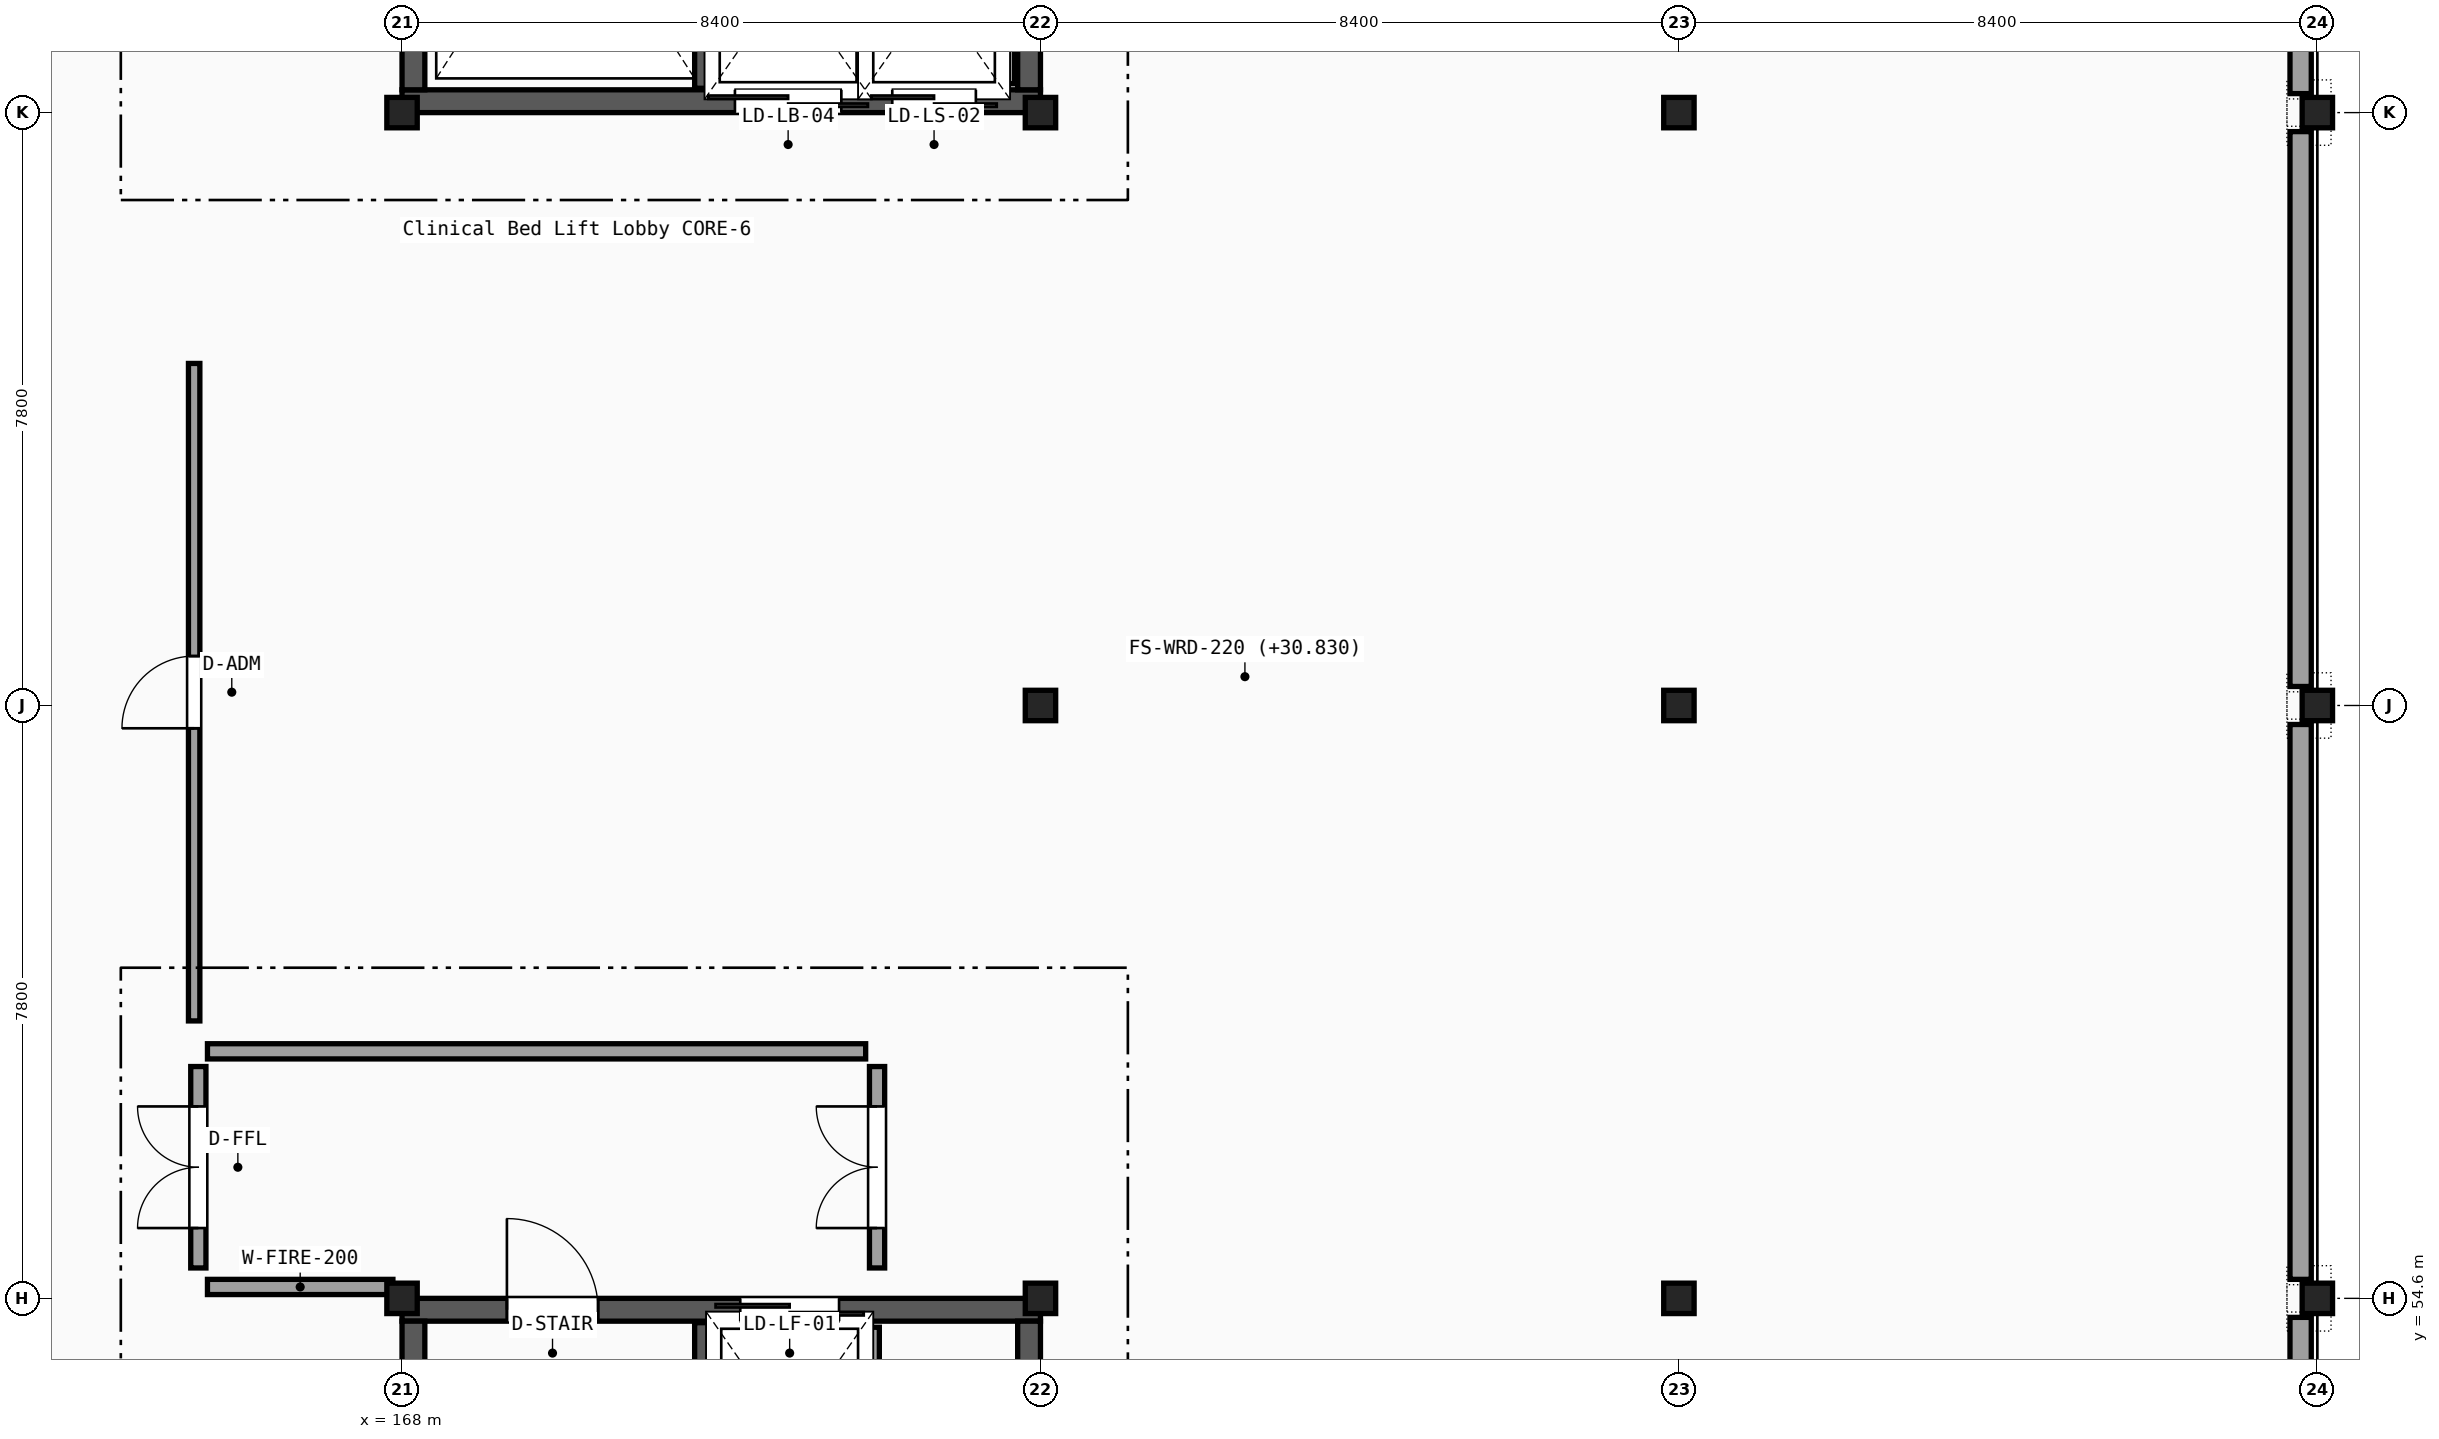
"""IFC4 building model, lengths in metres.
Left out: names, types, materials, properties, quantities, classifications, styles, units other than length and angle.
Written with IfcOpenShell. Run it as: python <this file> out.ifc"""

import sys

from ifc_helpers import new_model, si_unit, direction, frame, frame_2d, origin, origin_2d, place, context, subcontext, project, spatial, rectangle, i_section, extrude, element, fill, save


model = new_model("IFC4")
c1 = context("Model", 3, precision=1e-05, world=origin(), true_north=direction((0.0, 1.0)))
c2 = subcontext(c1, "Body", "Model", "MODEL_VIEW")
j1 = project(units=[si_unit("LENGTHUNIT", "METRE"), si_unit("PLANEANGLEUNIT", "RADIAN")], contexts=[c1])
p1 = place(None, origin())
s1 = spatial("IfcSite", under=j1, at=p1, CompositionType="ELEMENT")
p2 = place(p1, origin())
s2 = spatial("IfcBuilding", under=s1, at=p2, CompositionType="ELEMENT")
p3 = place(p2, frame((0.0, 0.0, 31.05)))
s3 = spatial("IfcBuildingStorey", under=s2, at=p3, CompositionType="ELEMENT", Elevation=31.05)
for number, where, z_axis, x_axis in (
    (1, (168.0, 54.6, 0.0), (0.0, 0.0, 1.0), (1.0, 0.0, 0.0)),
    (2, (168.0, 70.2, 0.0), (0.0, 0.0, 1.0), (1.0, 0.0, 0.0)),
    (3, (176.4, 54.6, 0.0), (0.0, 0.0, 1.0), (1.0, 0.0, 0.0)),
    (4, (176.4, 62.4, 0.0), (0.0, 0.0, 1.0), (1.0, 0.0, 0.0)),
    (5, (176.4, 70.2, 0.0), (0.0, 0.0, 1.0), (1.0, 0.0, 0.0)),
    (6, (184.8, 54.6, 0.0), (0.0, 0.0, 1.0), (1.0, 0.0, 0.0)),
    (7, (184.8, 62.4, 0.0), (0.0, 0.0, 1.0), (1.0, 0.0, 0.0)),
    (8, (184.8, 70.2, 0.0), (0.0, 0.0, 1.0), (1.0, 0.0, 0.0)),
    (9, (193.2, 54.6, 0.0), (0.0, 0.0, 1.0), (1.0, 0.0, 0.0)),
    (10, (193.2, 62.4, 0.0), (0.0, 0.0, 1.0), (1.0, 0.0, 0.0)),
    (11, (193.2, 70.2, 0.0), (0.0, 0.0, 1.0), (1.0, 0.0, 0.0)),
):
    element("IfcColumn", number, at=place(p3, frame(where, z_axis=z_axis, x_axis=x_axis)), inside=s3, PredefinedType="COLUMN", context=c2, shape_type="SweptSolid", body=[
        extrude(i_section(OverallWidth=0.3, OverallDepth=0.4, WebThickness=0.013, FlangeThickness=0.024, FilletRadius=0.027, at=origin_2d()), origin(), (0.0, 0.0, 1.0), 4.05),
    ])
p4 = place(p3, frame((192.98, 47.05, 0.0), z_axis=(0.0, 0.0, 1.0), x_axis=(0.0, 1.0, 0.0)))
e12 = element("IfcWall", 12, at=p4, inside=s3, PredefinedType="SOLIDWALL", context=c2, shape_type="SweptSolid", body=[
    extrude(rectangle(XDim=7.3, YDim=0.28, at=frame_2d((3.65, 0.0))), origin(), (0.0, 0.0, 1.0), 3.44),
])
p5 = place(p3, frame((192.98, 54.85, 0.0), z_axis=(0.0, 0.0, 1.0), x_axis=(0.0, 1.0, 0.0)))
e13 = element("IfcWall", 13, at=p5, inside=s3, PredefinedType="SOLIDWALL", context=c2, shape_type="SweptSolid", body=[
    extrude(rectangle(XDim=7.3, YDim=0.28, at=frame_2d((3.65, 0.0))), origin(), (0.0, 0.0, 1.0), 3.44),
])
p6 = place(p3, frame((192.98, 62.65, 0.0), z_axis=(0.0, 0.0, 1.0), x_axis=(0.0, 1.0, 0.0)))
e14 = element("IfcWall", 14, at=p6, inside=s3, PredefinedType="SOLIDWALL", context=c2, shape_type="SweptSolid", body=[
    extrude(rectangle(XDim=7.3, YDim=0.28, at=frame_2d((3.65, 0.0))), origin(), (0.0, 0.0, 1.0), 3.44),
])
p7 = place(p3, frame((192.98, 70.45, 0.0), z_axis=(0.0, 0.0, 1.0), x_axis=(0.0, 1.0, 0.0)))
e15 = element("IfcWall", 15, at=p7, inside=s3, PredefinedType="SOLIDWALL", context=c2, shape_type="SweptSolid", body=[
    extrude(rectangle(XDim=7.3, YDim=0.28, at=frame_2d((3.65, 0.0))), origin(), (0.0, 0.0, 1.0), 3.44),
])
p8 = place(p7, frame((2.05, 0.0, 0.75)))
e16 = element("IfcOpeningElement", 16, at=p8, cuts=e15, PredefinedType="OPENING", context=c2, shape_type="SweptSolid", body=[
    extrude(rectangle(XDim=3.2, YDim=1.8, at=frame_2d((1.6, 0.9))), frame((0.0, 0.15, 0.0), z_axis=(0.0, -1.0, 0.0), x_axis=(1.0, 0.0, 0.0)), (0.0, 0.0, 1.0), 0.3),
])
p9 = place(p3, frame((168.0, 54.45, 0.0), z_axis=(0.0, 0.0, 1.0), x_axis=(1.0, 0.0, 0.0)))
e17 = element("IfcWall", 17, at=p9, inside=s3, PredefinedType="SHEAR", context=c2, shape_type="SweptSolid", body=[
    extrude(rectangle(XDim=8.4, YDim=0.3, at=frame_2d((4.2, 0.0))), origin(), (0.0, 0.0, 1.0), 3.81),
])
p10 = place(p9, frame((1.38, 0.0, 0.0)))
e18 = element("IfcOpeningElement", 18, at=p10, cuts=e17, PredefinedType="OPENING", context=c2, shape_type="SweptSolid", body=[
    extrude(rectangle(XDim=1.2, YDim=2.15, at=frame_2d((0.6, 1.075))), frame((0.0, 0.16, 0.0), z_axis=(0.0, -1.0, 0.0), x_axis=(1.0, 0.0, 0.0)), (0.0, 0.0, 1.0), 0.32),
])
p11 = place(p9, frame((4.45, 0.0, 0.0)))
e19 = element("IfcOpeningElement", 19, at=p11, cuts=e17, PredefinedType="OPENING", context=c2, shape_type="SweptSolid", body=[
    extrude(rectangle(XDim=1.3, YDim=2.2, at=frame_2d((0.65, 1.1))), frame((0.0, 0.16, 0.0), z_axis=(0.0, -1.0, 0.0), x_axis=(1.0, 0.0, 0.0)), (0.0, 0.0, 1.0), 0.32),
])
for number, where, z_axis, x_axis in (
    (20, (168.15, 47.1, 0.0), (0.0, 0.0, 1.0), (0.0, 1.0, 0.0)),
    (21, (176.25, 47.1, 0.0), (0.0, 0.0, 1.0), (0.0, 1.0, 0.0)),
):
    element("IfcWall", number, at=place(p3, frame(where, z_axis=z_axis, x_axis=x_axis)), inside=s3, PredefinedType="SHEAR", context=c2, shape_type="SweptSolid", body=[
        extrude(rectangle(XDim=7.2, YDim=0.3, at=frame_2d((3.6, 0.0))), origin(), (0.0, 0.0, 1.0), 3.81),
    ])
p12 = place(p3, frame((171.95, 47.12, 0.0), z_axis=(0.0, 0.0, 1.0), x_axis=(0.0, 1.0, 0.0)))
e22 = element("IfcWall", 22, at=p12, inside=s3, PredefinedType="SHEAR", context=c2, shape_type="SweptSolid", body=[
    extrude(rectangle(XDim=7.16, YDim=0.2, at=frame_2d((3.58, 0.0))), origin(), (0.0, 0.0, 1.0), 3.81),
])
p13 = place(p3, frame((174.18, 51.48, 0.0), z_axis=(0.0, 0.0, 1.0), x_axis=(0.0, 1.0, 0.0)))
e23 = element("IfcWall", 23, at=p13, inside=s3, PredefinedType="PARTITIONING", context=c2, shape_type="SweptSolid", body=[
    extrude(rectangle(XDim=2.74, YDim=0.2, at=frame_2d((1.37, 0.0))), origin(), (0.0, 0.0, 1.0), 3.34),
])
p14 = place(p3, frame((165.44, 54.75, 0.0), z_axis=(0.0, 0.0, 1.0), x_axis=(1.0, 0.0, 0.0)))
e24 = element("IfcWall", 24, at=p14, inside=s3, PredefinedType="PARTITIONING", context=c2, shape_type="SweptSolid", body=[
    extrude(rectangle(XDim=2.44, YDim=0.2, at=frame_2d((1.22, 0.0))), origin(), (0.0, 0.0, 1.0), 3.34),
])
p15 = place(p3, frame((165.44, 57.85, 0.0), z_axis=(0.0, 0.0, 1.0), x_axis=(1.0, 0.0, 0.0)))
e25 = element("IfcWall", 25, at=p15, inside=s3, PredefinedType="PARTITIONING", context=c2, shape_type="SweptSolid", body=[
    extrude(rectangle(XDim=8.66, YDim=0.2, at=frame_2d((4.33, 0.0))), origin(), (0.0, 0.0, 1.0), 3.34),
])
p16 = place(p3, frame((165.32, 55.0, 0.0), z_axis=(0.0, 0.0, 1.0), x_axis=(0.0, 1.0, 0.0)))
e26 = element("IfcWall", 26, at=p16, inside=s3, PredefinedType="PARTITIONING", context=c2, shape_type="SweptSolid", body=[
    extrude(rectangle(XDim=2.65, YDim=0.2, at=frame_2d((1.325, 0.0))), origin(), (0.0, 0.0, 1.0), 3.34),
])
p17 = place(p16, frame((0.525, 0.0, 0.0)))
e27 = element("IfcOpeningElement", 27, at=p17, cuts=e26, PredefinedType="OPENING", context=c2, shape_type="SweptSolid", body=[
    extrude(rectangle(XDim=1.6, YDim=2.2, at=frame_2d((0.8, 1.1))), frame((0.0, 0.11, 0.0), z_axis=(0.0, -1.0, 0.0), x_axis=(1.0, 0.0, 0.0)), (0.0, 0.0, 1.0), 0.22),
])
p18 = place(p3, frame((174.25, 55.0, 0.0), z_axis=(0.0, 0.0, 1.0), x_axis=(0.0, 1.0, 0.0)))
e28 = element("IfcWall", 28, at=p18, inside=s3, PredefinedType="PARTITIONING", context=c2, shape_type="SweptSolid", body=[
    extrude(rectangle(XDim=2.65, YDim=0.2, at=frame_2d((1.325, 0.0))), origin(), (0.0, 0.0, 1.0), 3.34),
])
p19 = place(p18, frame((0.525, 0.0, 0.0)))
e29 = element("IfcOpeningElement", 29, at=p19, cuts=e28, PredefinedType="OPENING", context=c2, shape_type="SweptSolid", body=[
    extrude(rectangle(XDim=1.6, YDim=2.2, at=frame_2d((0.8, 1.1))), frame((0.0, 0.11, 0.0), z_axis=(0.0, -1.0, 0.0), x_axis=(1.0, 0.0, 0.0)), (0.0, 0.0, 1.0), 0.22),
])
p20 = place(p3, frame((168.0, 70.35, 0.0), z_axis=(0.0, 0.0, 1.0), x_axis=(1.0, 0.0, 0.0)))
e30 = element("IfcWall", 30, at=p20, inside=s3, PredefinedType="SHEAR", context=c2, shape_type="SweptSolid", body=[
    extrude(rectangle(XDim=8.4, YDim=0.3, at=frame_2d((4.2, 0.0))), origin(), (0.0, 0.0, 1.0), 3.81),
])
p21 = place(p20, frame((4.38, 0.0, 0.0)))
e31 = element("IfcOpeningElement", 31, at=p21, cuts=e30, PredefinedType="OPENING", context=c2, shape_type="SweptSolid", body=[
    extrude(rectangle(XDim=1.4, YDim=2.2, at=frame_2d((0.7, 1.1))), frame((0.0, 0.16, 0.0), z_axis=(0.0, -1.0, 0.0), x_axis=(1.0, 0.0, 0.0)), (0.0, 0.0, 1.0), 0.32),
])
p22 = place(p20, frame((6.45, 0.0, 0.0)))
e32 = element("IfcOpeningElement", 32, at=p22, cuts=e30, PredefinedType="OPENING", context=c2, shape_type="SweptSolid", body=[
    extrude(rectangle(XDim=1.1, YDim=2.15, at=frame_2d((0.55, 1.075))), frame((0.0, 0.16, 0.0), z_axis=(0.0, -1.0, 0.0), x_axis=(1.0, 0.0, 0.0)), (0.0, 0.0, 1.0), 0.32),
])
for number, where, z_axis, x_axis in (
    (33, (168.15, 70.5, 0.0), (0.0, 0.0, 1.0), (0.0, 1.0, 0.0)),
    (34, (176.25, 70.5, 0.0), (0.0, 0.0, 1.0), (0.0, 1.0, 0.0)),
):
    element("IfcWall", number, at=place(p3, frame(where, z_axis=z_axis, x_axis=x_axis)), inside=s3, PredefinedType="SHEAR", context=c2, shape_type="SweptSolid", body=[
        extrude(rectangle(XDim=7.2, YDim=0.3, at=frame_2d((3.6, 0.0))), origin(), (0.0, 0.0, 1.0), 3.81),
    ])
p23 = place(p3, frame((171.95, 70.52, 0.0), z_axis=(0.0, 0.0, 1.0), x_axis=(0.0, 1.0, 0.0)))
e35 = element("IfcWall", 35, at=p23, inside=s3, PredefinedType="SHEAR", context=c2, shape_type="SweptSolid", body=[
    extrude(rectangle(XDim=7.16, YDim=0.2, at=frame_2d((3.58, 0.0))), origin(), (0.0, 0.0, 1.0), 3.81),
])
p24 = place(p3, frame((174.14, 70.58, 0.0), z_axis=(0.0, 0.0, 1.0), x_axis=(0.0, 1.0, 0.0)))
e36 = element("IfcWall", 36, at=p24, inside=s3, PredefinedType="PARTITIONING", context=c2, shape_type="SweptSolid", body=[
    extrude(rectangle(XDim=2.74, YDim=0.2, at=frame_2d((1.37, 0.0))), origin(), (0.0, 0.0, 1.0), 3.34),
])
p25 = place(p3, frame((175.96, 70.58, 0.0), z_axis=(0.0, 0.0, 1.0), x_axis=(0.0, 1.0, 0.0)))
e37 = element("IfcWall", 37, at=p25, inside=s3, PredefinedType="PARTITIONING", context=c2, shape_type="SweptSolid", body=[
    extrude(rectangle(XDim=2.44, YDim=0.2, at=frame_2d((1.22, 0.0))), origin(), (0.0, 0.0, 1.0), 3.34),
])
p26 = place(p3, frame((165.265, 58.25, 0.0), z_axis=(0.0, 0.0, 1.0), x_axis=(0.0, 1.0, 0.0)))
e38 = element("IfcWall", 38, at=p26, inside=s3, PredefinedType="PARTITIONING", context=c2, shape_type="SweptSolid", body=[
    extrude(rectangle(XDim=8.65, YDim=0.15, at=frame_2d((4.325, 0.0))), origin(), (0.0, 0.0, 1.0), 3.34),
])
p27 = place(p26, frame((3.85, 0.0, 0.0)))
e39 = element("IfcOpeningElement", 39, at=p27, cuts=e38, PredefinedType="OPENING", context=c2, shape_type="SweptSolid", body=[
    extrude(rectangle(XDim=0.95, YDim=2.1, at=frame_2d((0.475, 1.05))), frame((0.0, 0.085, 0.0), z_axis=(0.0, -1.0, 0.0), x_axis=(1.0, 0.0, 0.0)), (0.0, 0.0, 1.0), 0.17),
])
p28 = place(p10, origin())
e40 = element("IfcDoor", 40, at=p28, inside=s3, OperationType="SINGLE_SWING_LEFT", PredefinedType="DOOR", context=c2, shape_type="SweptSolid", body=[
    extrude(rectangle(XDim=1.2, YDim=2.15, at=frame_2d((0.6, 1.075))), frame((0.0, 0.025, 0.0), z_axis=(0.0, -1.0, 0.0), x_axis=(1.0, 0.0, 0.0)), (0.0, 0.0, 1.0), 0.05),
])
fill(e18, e40)
p29 = place(p11, origin())
e41 = element("IfcDoor", 41, at=p29, inside=s3, OperationType="DOUBLE_DOOR_SLIDING", PredefinedType="DOOR", context=c2, shape_type="SweptSolid", body=[
    extrude(rectangle(XDim=1.3, YDim=2.2, at=frame_2d((0.65, 1.1))), frame((0.0, 0.025, 0.0), z_axis=(0.0, -1.0, 0.0), x_axis=(1.0, 0.0, 0.0)), (0.0, 0.0, 1.0), 0.05),
])
fill(e19, e41)
p30 = place(p17, origin())
e42 = element("IfcDoor", 42, at=p30, inside=s3, OperationType="DOUBLE_DOOR_SINGLE_SWING", PredefinedType="DOOR", context=c2, shape_type="SweptSolid", body=[
    extrude(rectangle(XDim=1.6, YDim=2.2, at=frame_2d((0.8, 1.1))), frame((0.0, 0.025, 0.0), z_axis=(0.0, -1.0, 0.0), x_axis=(1.0, 0.0, 0.0)), (0.0, 0.0, 1.0), 0.05),
])
fill(e27, e42)
p31 = place(p19, origin())
e43 = element("IfcDoor", 43, at=p31, inside=s3, OperationType="DOUBLE_DOOR_SINGLE_SWING", PredefinedType="DOOR", context=c2, shape_type="SweptSolid", body=[
    extrude(rectangle(XDim=1.6, YDim=2.2, at=frame_2d((0.8, 1.1))), frame((0.0, 0.025, 0.0), z_axis=(0.0, -1.0, 0.0), x_axis=(1.0, 0.0, 0.0)), (0.0, 0.0, 1.0), 0.05),
])
fill(e29, e43)
p32 = place(p21, origin())
e44 = element("IfcDoor", 44, at=p32, inside=s3, OperationType="DOUBLE_DOOR_SLIDING", PredefinedType="DOOR", context=c2, shape_type="SweptSolid", body=[
    extrude(rectangle(XDim=1.4, YDim=2.2, at=frame_2d((0.7, 1.1))), frame((0.0, 0.025, 0.0), z_axis=(0.0, -1.0, 0.0), x_axis=(1.0, 0.0, 0.0)), (0.0, 0.0, 1.0), 0.05),
])
fill(e31, e44)
p33 = place(p22, origin())
e45 = element("IfcDoor", 45, at=p33, inside=s3, OperationType="DOUBLE_DOOR_SLIDING", PredefinedType="DOOR", context=c2, shape_type="SweptSolid", body=[
    extrude(rectangle(XDim=1.1, YDim=2.15, at=frame_2d((0.55, 1.075))), frame((0.0, 0.025, 0.0), z_axis=(0.0, -1.0, 0.0), x_axis=(1.0, 0.0, 0.0)), (0.0, 0.0, 1.0), 0.05),
])
fill(e32, e45)
p34 = place(p27, origin())
e46 = element("IfcDoor", 46, at=p34, inside=s3, OperationType="SINGLE_SWING_LEFT", PredefinedType="DOOR", context=c2, shape_type="SweptSolid", body=[
    extrude(rectangle(XDim=0.95, YDim=2.1, at=frame_2d((0.475, 1.05))), frame((0.0, 0.025, 0.0), z_axis=(0.0, -1.0, 0.0), x_axis=(1.0, 0.0, 0.0)), (0.0, 0.0, 1.0), 0.05),
])
fill(e39, e46)
save(model, sys.argv[1])
